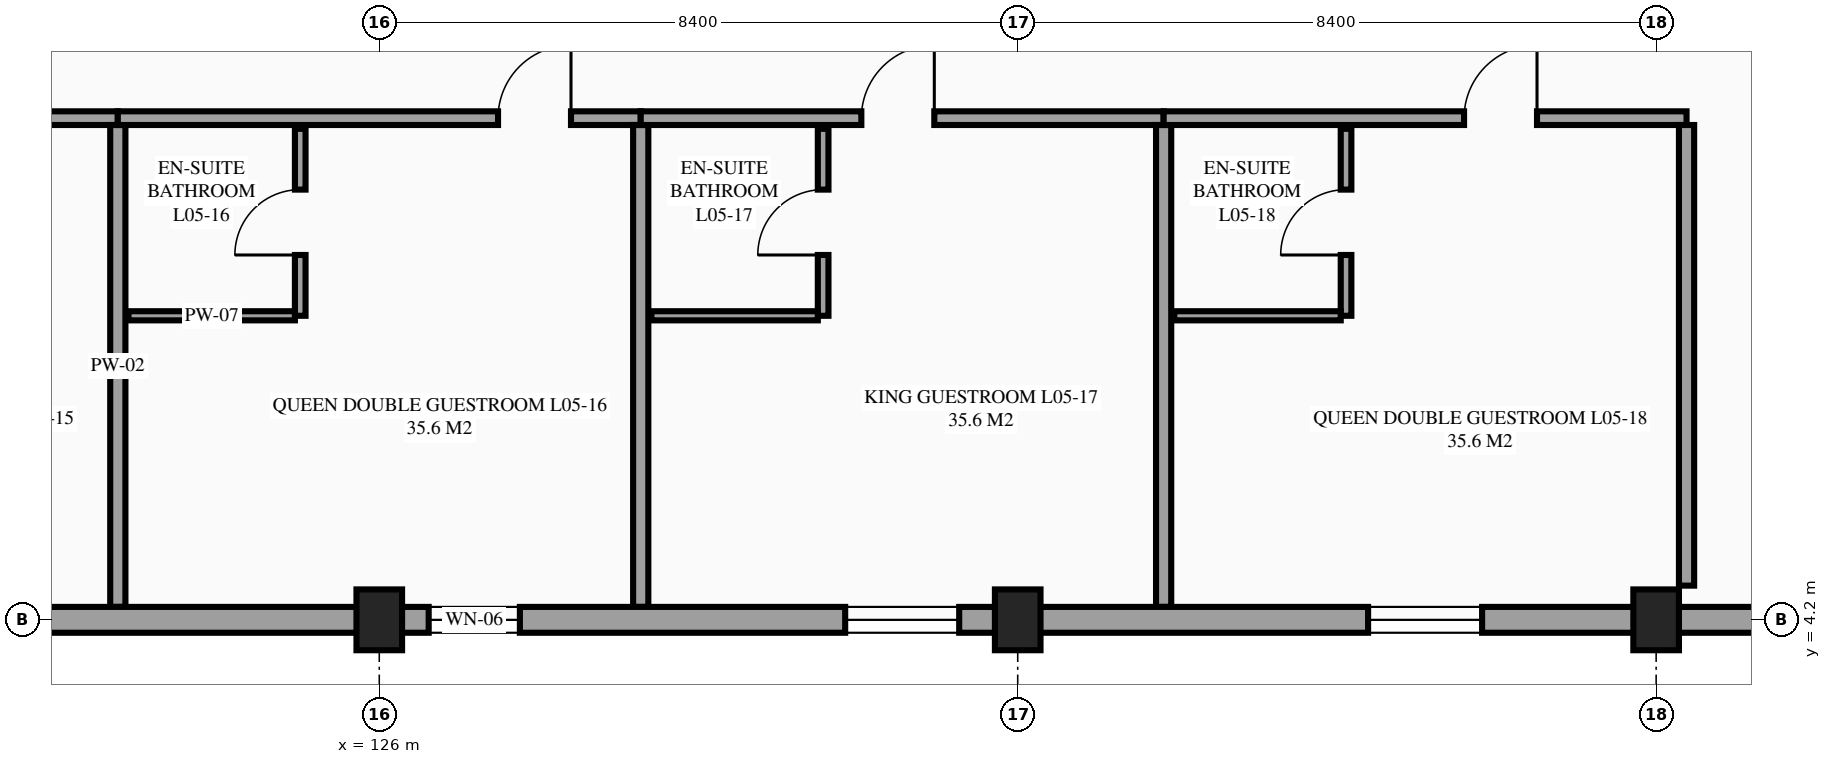
"""IFC4 building model, lengths in metres.
Left out: names, types, materials, properties, quantities, classifications, styles, units other than length and angle.
Written with IfcOpenShell. Run it as: python <this file> out.ifc"""

import sys

from ifc_helpers import new_model, si_unit, direction, frame, frame_2d, origin, origin_2d, place, context, subcontext, project, spatial, rectangle, extrude, element, fill, save


model = new_model("IFC4")
c1 = context("Model", 3, precision=1e-05, world=origin(), true_north=direction((0.0, 1.0)))
c2 = subcontext(c1, "Body", "Model", "MODEL_VIEW")
j1 = project(units=[si_unit("LENGTHUNIT", "METRE"), si_unit("PLANEANGLEUNIT", "RADIAN")], contexts=[c1])
p1 = place(None, origin())
s1 = spatial("IfcSite", under=j1, at=p1, CompositionType="ELEMENT")
p2 = place(p1, origin())
s2 = spatial("IfcBuilding", under=s1, at=p2, CompositionType="ELEMENT")
p3 = place(p2, frame((0.0, 0.0, 21.9)))
s3 = spatial("IfcBuildingStorey", under=s2, at=p3, CompositionType="ELEMENT", Elevation=21.9)
for number, where, z_axis, x_axis in (
    (1, (126.0, 4.2, 0.0), (0.0, 0.0, 1.0), (1.0, 0.0, 0.0)),
    (2, (134.4, 4.2, 0.0), (0.0, 0.0, 1.0), (1.0, 0.0, 0.0)),
    (3, (142.8, 4.2, 0.0), (0.0, 0.0, 1.0), (1.0, 0.0, 0.0)),
):
    element("IfcColumn", number, at=place(p3, frame(where, z_axis=z_axis, x_axis=x_axis)), inside=s3, PredefinedType="COLUMN", context=c2, shape_type="SweptSolid", body=[
        extrude(rectangle(XDim=0.6, YDim=0.8, at=origin_2d()), origin(), (0.0, 0.0, 1.0), 3.6),
    ])
p4 = place(p3, frame((115.68, 10.8, 0.0), z_axis=(0.0, 0.0, 1.0), x_axis=(1.0, 0.0, 0.0)))
e4 = element("IfcWall", 4, at=p4, inside=s3, PredefinedType="PARTITIONING", context=c2, shape_type="SweptSolid", body=[
    extrude(rectangle(XDim=6.88, YDim=0.18, at=frame_2d((3.44, 0.0))), origin(), (0.0, 0.0, 1.0), 3.375),
])
p5 = place(p4, frame((4.653, 0.0, 0.0)))
e5 = element("IfcOpeningElement", 5, at=p5, cuts=e4, PredefinedType="OPENING", context=c2, shape_type="SweptSolid", body=[
    extrude(rectangle(XDim=0.96, YDim=2.15, at=frame_2d((0.48, 1.075))), frame((0.0, 0.1, 0.0), z_axis=(0.0, -1.0, 0.0), x_axis=(1.0, 0.0, 0.0)), (0.0, 0.0, 1.0), 0.2),
])
p6 = place(p3, frame((122.56, 4.37, 0.0), z_axis=(0.0, 0.0, 1.0), x_axis=(0.0, 1.0, 0.0)))
e6 = element("IfcWall", 6, at=p6, inside=s3, PredefinedType="PARTITIONING", context=c2, shape_type="SweptSolid", body=[
    extrude(rectangle(XDim=6.34, YDim=0.2, at=frame_2d((3.17, 0.0))), origin(), (0.0, 0.0, 1.0), 3.375),
])
p7 = place(p3, frame((122.56, 10.8, 0.0), z_axis=(0.0, 0.0, 1.0), x_axis=(1.0, 0.0, 0.0)))
e7 = element("IfcWall", 7, at=p7, inside=s3, PredefinedType="PARTITIONING", context=c2, shape_type="SweptSolid", body=[
    extrude(rectangle(XDim=6.88, YDim=0.18, at=frame_2d((3.44, 0.0))), origin(), (0.0, 0.0, 1.0), 3.375),
])
p8 = place(p7, frame((5.003, 0.0, 0.0)))
e8 = element("IfcOpeningElement", 8, at=p8, cuts=e7, PredefinedType="OPENING", context=c2, shape_type="SweptSolid", body=[
    extrude(rectangle(XDim=0.96, YDim=2.15, at=frame_2d((0.48, 1.075))), frame((0.0, 0.1, 0.0), z_axis=(0.0, -1.0, 0.0), x_axis=(1.0, 0.0, 0.0)), (0.0, 0.0, 1.0), 0.2),
])
p9 = place(p3, frame((129.44, 4.37, 0.0), z_axis=(0.0, 0.0, 1.0), x_axis=(0.0, 1.0, 0.0)))
e9 = element("IfcWall", 9, at=p9, inside=s3, PredefinedType="PARTITIONING", context=c2, shape_type="SweptSolid", body=[
    extrude(rectangle(XDim=6.34, YDim=0.2, at=frame_2d((3.17, 0.0))), origin(), (0.0, 0.0, 1.0), 3.375),
])
p10 = place(p3, frame((124.96, 8.2, 0.0), z_axis=(0.0, 0.0, 1.0), x_axis=(0.0, 1.0, 0.0)))
e10 = element("IfcWall", 10, at=p10, inside=s3, PredefinedType="PARTITIONING", context=c2, shape_type="SweptSolid", body=[
    extrude(rectangle(XDim=2.46, YDim=0.14, at=frame_2d((1.23, 0.0))), origin(), (0.0, 0.0, 1.0), 3.375),
])
p11 = place(p10, frame((0.8, 0.0, 0.0)))
e11 = element("IfcOpeningElement", 11, at=p11, cuts=e10, PredefinedType="OPENING", context=c2, shape_type="SweptSolid", body=[
    extrude(rectangle(XDim=0.86, YDim=2.1, at=frame_2d((0.43, 1.05))), frame((0.0, 0.08, 0.0), z_axis=(0.0, -1.0, 0.0), x_axis=(1.0, 0.0, 0.0)), (0.0, 0.0, 1.0), 0.16),
])
p12 = place(p3, frame((122.7, 8.2, 0.0), z_axis=(0.0, 0.0, 1.0), x_axis=(1.0, 0.0, 0.0)))
e12 = element("IfcWall", 12, at=p12, inside=s3, PredefinedType="PARTITIONING", context=c2, shape_type="SweptSolid", body=[
    extrude(rectangle(XDim=2.19, YDim=0.12, at=frame_2d((1.095, 0.0))), origin(), (0.0, 0.0, 1.0), 3.375),
])
p13 = place(p3, frame((129.44, 10.8, 0.0), z_axis=(0.0, 0.0, 1.0), x_axis=(1.0, 0.0, 0.0)))
e13 = element("IfcWall", 13, at=p13, inside=s3, PredefinedType="PARTITIONING", context=c2, shape_type="SweptSolid", body=[
    extrude(rectangle(XDim=6.88, YDim=0.18, at=frame_2d((3.44, 0.0))), origin(), (0.0, 0.0, 1.0), 3.375),
])
p14 = place(p13, frame((2.903, 0.0, 0.0)))
e14 = element("IfcOpeningElement", 14, at=p14, cuts=e13, PredefinedType="OPENING", context=c2, shape_type="SweptSolid", body=[
    extrude(rectangle(XDim=0.96, YDim=2.15, at=frame_2d((0.48, 1.075))), frame((0.0, 0.1, 0.0), z_axis=(0.0, -1.0, 0.0), x_axis=(1.0, 0.0, 0.0)), (0.0, 0.0, 1.0), 0.2),
])
p15 = place(p3, frame((136.32, 4.37, 0.0), z_axis=(0.0, 0.0, 1.0), x_axis=(0.0, 1.0, 0.0)))
e15 = element("IfcWall", 15, at=p15, inside=s3, PredefinedType="PARTITIONING", context=c2, shape_type="SweptSolid", body=[
    extrude(rectangle(XDim=6.34, YDim=0.2, at=frame_2d((3.17, 0.0))), origin(), (0.0, 0.0, 1.0), 3.375),
])
p16 = place(p3, frame((131.84, 8.2, 0.0), z_axis=(0.0, 0.0, 1.0), x_axis=(0.0, 1.0, 0.0)))
e16 = element("IfcWall", 16, at=p16, inside=s3, PredefinedType="PARTITIONING", context=c2, shape_type="SweptSolid", body=[
    extrude(rectangle(XDim=2.46, YDim=0.14, at=frame_2d((1.23, 0.0))), origin(), (0.0, 0.0, 1.0), 3.375),
])
p17 = place(p16, frame((0.8, 0.0, 0.0)))
e17 = element("IfcOpeningElement", 17, at=p17, cuts=e16, PredefinedType="OPENING", context=c2, shape_type="SweptSolid", body=[
    extrude(rectangle(XDim=0.86, YDim=2.1, at=frame_2d((0.43, 1.05))), frame((0.0, 0.08, 0.0), z_axis=(0.0, -1.0, 0.0), x_axis=(1.0, 0.0, 0.0)), (0.0, 0.0, 1.0), 0.16),
])
p18 = place(p3, frame((129.58, 8.2, 0.0), z_axis=(0.0, 0.0, 1.0), x_axis=(1.0, 0.0, 0.0)))
e18 = element("IfcWall", 18, at=p18, inside=s3, PredefinedType="PARTITIONING", context=c2, shape_type="SweptSolid", body=[
    extrude(rectangle(XDim=2.19, YDim=0.12, at=frame_2d((1.095, 0.0))), origin(), (0.0, 0.0, 1.0), 3.375),
])
p19 = place(p3, frame((136.32, 10.8, 0.0), z_axis=(0.0, 0.0, 1.0), x_axis=(1.0, 0.0, 0.0)))
e19 = element("IfcWall", 19, at=p19, inside=s3, PredefinedType="PARTITIONING", context=c2, shape_type="SweptSolid", body=[
    extrude(rectangle(XDim=6.88, YDim=0.18, at=frame_2d((3.44, 0.0))), origin(), (0.0, 0.0, 1.0), 3.375),
])
p20 = place(p19, frame((3.953, 0.0, 0.0)))
e20 = element("IfcOpeningElement", 20, at=p20, cuts=e19, PredefinedType="OPENING", context=c2, shape_type="SweptSolid", body=[
    extrude(rectangle(XDim=0.96, YDim=2.15, at=frame_2d((0.48, 1.075))), frame((0.0, 0.1, 0.0), z_axis=(0.0, -1.0, 0.0), x_axis=(1.0, 0.0, 0.0)), (0.0, 0.0, 1.0), 0.2),
])
p21 = place(p3, frame((143.2, 4.65, 0.0), z_axis=(0.0, 0.0, 1.0), x_axis=(0.0, 1.0, 0.0)))
e21 = element("IfcWall", 21, at=p21, inside=s3, PredefinedType="PARTITIONING", context=c2, shape_type="SweptSolid", body=[
    extrude(rectangle(XDim=6.06, YDim=0.2, at=frame_2d((3.03, 0.0))), origin(), (0.0, 0.0, 1.0), 3.375),
])
p22 = place(p3, frame((138.72, 8.2, 0.0), z_axis=(0.0, 0.0, 1.0), x_axis=(0.0, 1.0, 0.0)))
e22 = element("IfcWall", 22, at=p22, inside=s3, PredefinedType="PARTITIONING", context=c2, shape_type="SweptSolid", body=[
    extrude(rectangle(XDim=2.46, YDim=0.14, at=frame_2d((1.23, 0.0))), origin(), (0.0, 0.0, 1.0), 3.375),
])
p23 = place(p22, frame((0.8, 0.0, 0.0)))
e23 = element("IfcOpeningElement", 23, at=p23, cuts=e22, PredefinedType="OPENING", context=c2, shape_type="SweptSolid", body=[
    extrude(rectangle(XDim=0.86, YDim=2.1, at=frame_2d((0.43, 1.05))), frame((0.0, 0.08, 0.0), z_axis=(0.0, -1.0, 0.0), x_axis=(1.0, 0.0, 0.0)), (0.0, 0.0, 1.0), 0.16),
])
p24 = place(p3, frame((136.46, 8.2, 0.0), z_axis=(0.0, 0.0, 1.0), x_axis=(1.0, 0.0, 0.0)))
e24 = element("IfcWall", 24, at=p24, inside=s3, PredefinedType="PARTITIONING", context=c2, shape_type="SweptSolid", body=[
    extrude(rectangle(XDim=2.19, YDim=0.12, at=frame_2d((1.095, 0.0))), origin(), (0.0, 0.0, 1.0), 3.375),
])
p25 = place(p3, frame((117.6, 4.2, 0.0), z_axis=(0.0, 0.0, 1.0), x_axis=(1.0, 0.0, 0.0)))
e25 = element("IfcWall", 25, at=p25, inside=s3, PredefinedType="STANDARD", context=c2, shape_type="SweptSolid", body=[
    extrude(rectangle(XDim=8.4, YDim=0.34, at=frame_2d((4.2, 0.0))), origin(), (0.0, 0.0, 1.0), 2.68),
])
p26 = place(p25, frame((0.77, 0.0, 0.85)))
e26 = element("IfcOpeningElement", 26, at=p26, cuts=e25, PredefinedType="OPENING", context=c2, shape_type="SweptSolid", body=[
    extrude(rectangle(XDim=1.5, YDim=1.5, at=frame_2d((0.75, 0.75))), frame((0.0, 0.18, 0.0), z_axis=(0.0, -1.0, 0.0), x_axis=(1.0, 0.0, 0.0)), (0.0, 0.0, 1.0), 0.36),
])
p27 = place(p3, frame((126.0, 4.2, 0.0), z_axis=(0.0, 0.0, 1.0), x_axis=(1.0, 0.0, 0.0)))
e27 = element("IfcWall", 27, at=p27, inside=s3, PredefinedType="STANDARD", context=c2, shape_type="SweptSolid", body=[
    extrude(rectangle(XDim=8.4, YDim=0.34, at=frame_2d((4.2, 0.0))), origin(), (0.0, 0.0, 1.0), 2.78),
])
p28 = place(p27, frame((0.65, 0.0, 0.85)))
e28 = element("IfcOpeningElement", 28, at=p28, cuts=e27, PredefinedType="OPENING", context=c2, shape_type="SweptSolid", body=[
    extrude(rectangle(XDim=1.2, YDim=1.5, at=frame_2d((0.6, 0.75))), frame((0.0, 0.18, 0.0), z_axis=(0.0, -1.0, 0.0), x_axis=(1.0, 0.0, 0.0)), (0.0, 0.0, 1.0), 0.36),
])
p29 = place(p27, frame((6.13, 0.0, 0.85)))
e29 = element("IfcOpeningElement", 29, at=p29, cuts=e27, PredefinedType="OPENING", context=c2, shape_type="SweptSolid", body=[
    extrude(rectangle(XDim=1.5, YDim=1.5, at=frame_2d((0.75, 0.75))), frame((0.0, 0.18, 0.0), z_axis=(0.0, -1.0, 0.0), x_axis=(1.0, 0.0, 0.0)), (0.0, 0.0, 1.0), 0.36),
])
p30 = place(p3, frame((134.4, 4.2, 0.0), z_axis=(0.0, 0.0, 1.0), x_axis=(1.0, 0.0, 0.0)))
e30 = element("IfcWall", 30, at=p30, inside=s3, PredefinedType="STANDARD", context=c2, shape_type="SweptSolid", body=[
    extrude(rectangle(XDim=8.4, YDim=0.34, at=frame_2d((4.2, 0.0))), origin(), (0.0, 0.0, 1.0), 2.88),
])
p31 = place(p30, frame((4.61, 0.0, 0.85)))
e31 = element("IfcOpeningElement", 31, at=p31, cuts=e30, PredefinedType="OPENING", context=c2, shape_type="SweptSolid", body=[
    extrude(rectangle(XDim=1.5, YDim=1.5, at=frame_2d((0.75, 0.75))), frame((0.0, 0.18, 0.0), z_axis=(0.0, -1.0, 0.0), x_axis=(1.0, 0.0, 0.0)), (0.0, 0.0, 1.0), 0.36),
])
p32 = place(p3, frame((142.8, 4.2, 0.0), z_axis=(0.0, 0.0, 1.0), x_axis=(1.0, 0.0, 0.0)))
e32 = element("IfcWall", 32, at=p32, inside=s3, PredefinedType="STANDARD", context=c2, shape_type="SweptSolid", body=[
    extrude(rectangle(XDim=16.8, YDim=0.34, at=frame_2d((8.4, 0.0))), origin(), (0.0, 0.0, 1.0), 2.48),
])
p33 = place(p32, frame((10.05, 0.0, 0.85)))
e33 = element("IfcOpeningElement", 33, at=p33, cuts=e32, PredefinedType="OPENING", context=c2, shape_type="SweptSolid", body=[
    extrude(rectangle(XDim=1.5, YDim=1.5, at=frame_2d((0.75, 0.75))), frame((0.0, 0.18, 0.0), z_axis=(0.0, -1.0, 0.0), x_axis=(1.0, 0.0, 0.0)), (0.0, 0.0, 1.0), 0.36),
])
p34 = place(p32, frame((14.65, 0.0, 0.85)))
e34 = element("IfcOpeningElement", 34, at=p34, cuts=e32, PredefinedType="OPENING", context=c2, shape_type="SweptSolid", body=[
    extrude(rectangle(XDim=1.5, YDim=1.5, at=frame_2d((0.75, 0.75))), frame((0.0, 0.18, 0.0), z_axis=(0.0, -1.0, 0.0), x_axis=(1.0, 0.0, 0.0)), (0.0, 0.0, 1.0), 0.36),
])
p35 = place(p28, origin())
e35 = element("IfcWindow", 35, at=p35, inside=s3, PartitioningType="SINGLE_PANEL", PredefinedType="WINDOW", context=c2, shape_type="SweptSolid", body=[
    extrude(rectangle(XDim=1.2, YDim=1.5, at=frame_2d((0.6, 0.75))), frame((0.0, 0.03, 0.0), z_axis=(0.0, -1.0, 0.0), x_axis=(1.0, 0.0, 0.0)), (0.0, 0.0, 1.0), 0.06),
])
fill(e28, e35)
p36 = place(p29, origin())
e36 = element("IfcWindow", 36, at=p36, inside=s3, PartitioningType="SINGLE_PANEL", PredefinedType="WINDOW", context=c2, shape_type="SweptSolid", body=[
    extrude(rectangle(XDim=1.5, YDim=1.5, at=frame_2d((0.75, 0.75))), frame((0.0, 0.03, 0.0), z_axis=(0.0, -1.0, 0.0), x_axis=(1.0, 0.0, 0.0)), (0.0, 0.0, 1.0), 0.06),
])
fill(e29, e36)
p37 = place(p31, origin())
e37 = element("IfcWindow", 37, at=p37, inside=s3, PartitioningType="SINGLE_PANEL", PredefinedType="WINDOW", context=c2, shape_type="SweptSolid", body=[
    extrude(rectangle(XDim=1.5, YDim=1.5, at=frame_2d((0.75, 0.75))), frame((0.0, 0.03, 0.0), z_axis=(0.0, -1.0, 0.0), x_axis=(1.0, 0.0, 0.0)), (0.0, 0.0, 1.0), 0.06),
])
fill(e31, e37)
p38 = place(p8, origin())
e38 = element("IfcDoor", 38, at=p38, inside=s3, OperationType="SINGLE_SWING_RIGHT", PredefinedType="DOOR", context=c2, shape_type="SweptSolid", body=[
    extrude(rectangle(XDim=0.96, YDim=2.15, at=frame_2d((0.48, 1.075))), frame((0.0, 0.025, 0.0), z_axis=(0.0, -1.0, 0.0), x_axis=(1.0, 0.0, 0.0)), (0.0, 0.0, 1.0), 0.05),
])
fill(e8, e38)
p39 = place(p11, origin())
e39 = element("IfcDoor", 39, at=p39, inside=s3, OperationType="SINGLE_SWING_LEFT", PredefinedType="DOOR", context=c2, shape_type="SweptSolid", body=[
    extrude(rectangle(XDim=0.86, YDim=2.1, at=frame_2d((0.43, 1.05))), frame((0.0, 0.025, 0.0), z_axis=(0.0, -1.0, 0.0), x_axis=(1.0, 0.0, 0.0)), (0.0, 0.0, 1.0), 0.05),
])
fill(e11, e39)
p40 = place(p14, origin())
e40 = element("IfcDoor", 40, at=p40, inside=s3, OperationType="SINGLE_SWING_RIGHT", PredefinedType="DOOR", context=c2, shape_type="SweptSolid", body=[
    extrude(rectangle(XDim=0.96, YDim=2.15, at=frame_2d((0.48, 1.075))), frame((0.0, 0.025, 0.0), z_axis=(0.0, -1.0, 0.0), x_axis=(1.0, 0.0, 0.0)), (0.0, 0.0, 1.0), 0.05),
])
fill(e14, e40)
p41 = place(p17, origin())
e41 = element("IfcDoor", 41, at=p41, inside=s3, OperationType="SINGLE_SWING_LEFT", PredefinedType="DOOR", context=c2, shape_type="SweptSolid", body=[
    extrude(rectangle(XDim=0.86, YDim=2.1, at=frame_2d((0.43, 1.05))), frame((0.0, 0.025, 0.0), z_axis=(0.0, -1.0, 0.0), x_axis=(1.0, 0.0, 0.0)), (0.0, 0.0, 1.0), 0.05),
])
fill(e17, e41)
p42 = place(p20, origin())
e42 = element("IfcDoor", 42, at=p42, inside=s3, OperationType="SINGLE_SWING_RIGHT", PredefinedType="DOOR", context=c2, shape_type="SweptSolid", body=[
    extrude(rectangle(XDim=0.96, YDim=2.15, at=frame_2d((0.48, 1.075))), frame((0.0, 0.025, 0.0), z_axis=(0.0, -1.0, 0.0), x_axis=(1.0, 0.0, 0.0)), (0.0, 0.0, 1.0), 0.05),
])
fill(e20, e42)
p43 = place(p23, origin())
e43 = element("IfcDoor", 43, at=p43, inside=s3, OperationType="SINGLE_SWING_LEFT", PredefinedType="DOOR", context=c2, shape_type="SweptSolid", body=[
    extrude(rectangle(XDim=0.86, YDim=2.1, at=frame_2d((0.43, 1.05))), frame((0.0, 0.025, 0.0), z_axis=(0.0, -1.0, 0.0), x_axis=(1.0, 0.0, 0.0)), (0.0, 0.0, 1.0), 0.05),
])
fill(e23, e43)
save(model, sys.argv[1])
